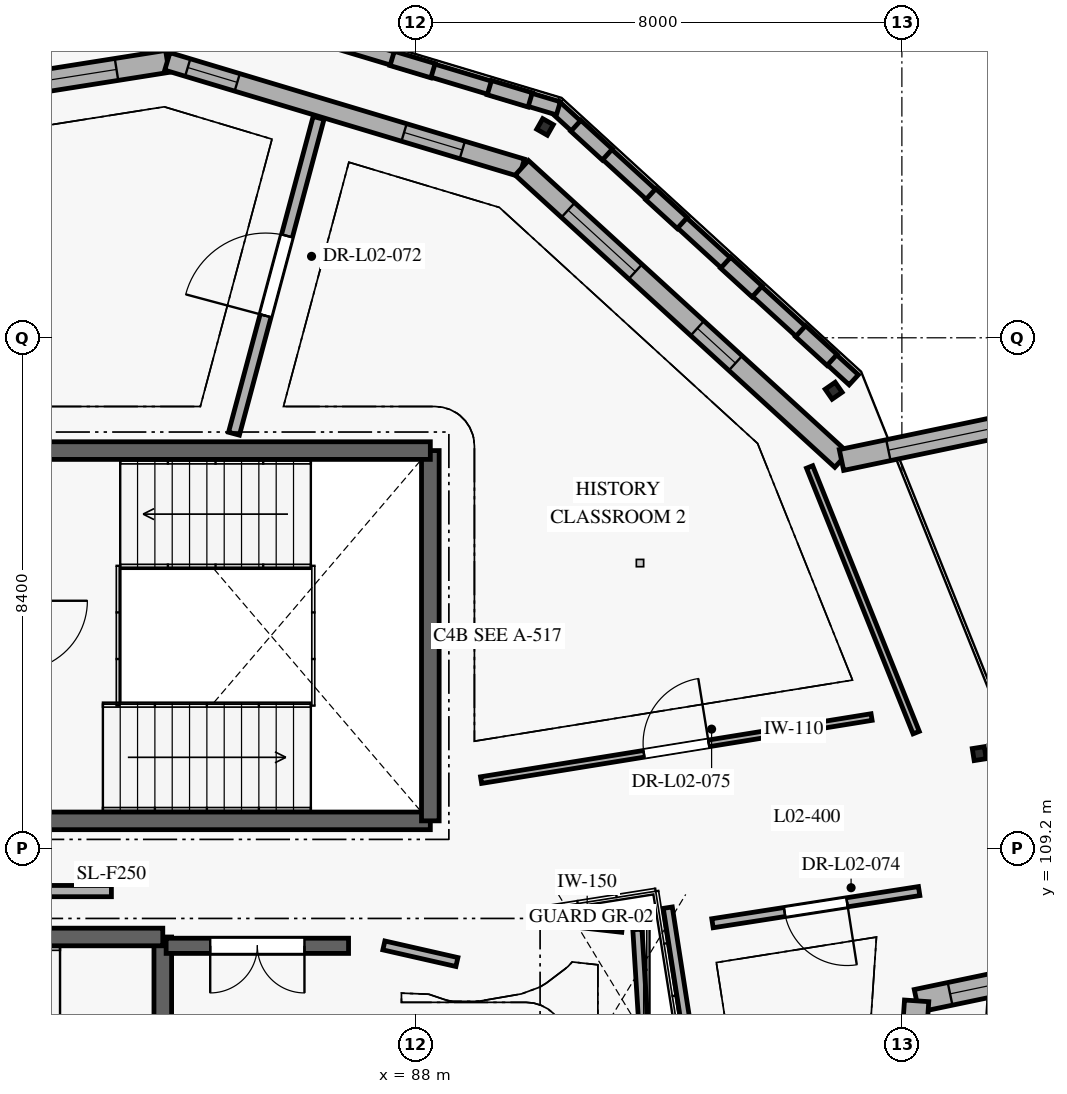
"""IFC4 building model, lengths in metres.
Left out: names, types, materials, properties, quantities, classifications, styles, units other than length and angle.
Written with IfcOpenShell. Run it as: python <this file> out.ifc"""

import sys

from ifc_helpers import new_model, si_unit, direction, frame, frame_2d, origin, origin_2d, place, context, subcontext, project, spatial, rectangle, hollow_rectangle, extrude, element, fill, save


model = new_model("IFC4")
c1 = context("Model", 3, precision=1e-05, world=origin(), true_north=direction((0.0, 1.0)))
c2 = subcontext(c1, "Body", "Model", "MODEL_VIEW")
j1 = project(units=[si_unit("LENGTHUNIT", "METRE"), si_unit("PLANEANGLEUNIT", "RADIAN")], contexts=[c1])
p1 = place(None, origin())
s1 = spatial("IfcSite", under=j1, at=p1, CompositionType="ELEMENT")
p2 = place(p1, origin())
s2 = spatial("IfcBuilding", under=s1, at=p2, CompositionType="ELEMENT")
p3 = place(p2, frame((0.0, 0.0, 8.4)))
s3 = spatial("IfcBuildingStorey", under=s2, at=p3, CompositionType="ELEMENT", Elevation=8.4)
for number, where, z_axis, x_axis in (
    (1, (97.272, 110.76, 0.0), (0.0, 0.0, 1.0), (-0.156, 0.988, 0.0)),
    (2, (94.878, 116.729, 0.0), (0.0, 0.0, 1.0), (-0.569, 0.822, 0.0)),
    (3, (90.131, 121.068, 0.0), (0.0, 0.0, 1.0), (-0.87, 0.493, 0.0)),
):
    element("IfcColumn", number, at=place(p3, frame(where, z_axis=z_axis, x_axis=x_axis)), inside=s3, PredefinedType="COLUMN", context=c2, shape_type="SweptSolid", body=[
        extrude(hollow_rectangle(XDim=0.2, YDim=0.2, WallThickness=0.012, InnerFilletRadius=0.012, OuterFilletRadius=0.019, at=origin_2d()), origin(), (0.0, 0.0, 1.0), 4.2),
    ])
p4 = place(p3, frame((103.532, 108.22, 0.0), z_axis=(0.0, 0.0, 1.0), x_axis=(-0.978786344777, -0.204883604222, 0.0)))
e4 = element("IfcWall", 4, at=p4, inside=s3, PredefinedType="SOLIDWALL", context=c2, shape_type="SweptSolid", body=[
    extrude(rectangle(XDim=7.448, YDim=0.38, at=frame_2d((3.724, 0.0))), origin(), (0.0, 0.0, 1.0), 3.94),
])
p5 = place(p4, frame((0.662, 0.0, 0.85)))
e5 = element("IfcOpeningElement", 5, at=p5, cuts=e4, PredefinedType="OPENING", context=c2, shape_type="SweptSolid", body=[
    extrude(rectangle(XDim=2.4, YDim=1.6, at=frame_2d((1.2, 0.8))), frame((0.0, 0.2, 0.0), z_axis=(0.0, -1.0, 0.0), x_axis=(1.0, 0.0, 0.0)), (0.0, 0.0, 1.0), 0.4),
])
p6 = place(p4, frame((4.286, 0.0, 0.85)))
e6 = element("IfcOpeningElement", 6, at=p6, cuts=e4, PredefinedType="OPENING", context=c2, shape_type="SweptSolid", body=[
    extrude(rectangle(XDim=2.6, YDim=1.6, at=frame_2d((1.3, 0.8))), frame((0.0, 0.2, 0.0), z_axis=(0.0, -1.0, 0.0), x_axis=(1.0, 0.0, 0.0)), (0.0, 0.0, 1.0), 0.4),
])
p7 = place(p3, frame((96.243, 106.695, 0.0), z_axis=(0.0, 0.0, 1.0), x_axis=(-0.067309145793, -0.997732167915, 0.0)))
e7 = element("IfcWall", 7, at=p7, inside=s3, PredefinedType="SOLIDWALL", context=c2, shape_type="SweptSolid", body=[
    extrude(rectangle(XDim=2.133, YDim=0.4, at=frame_2d((1.066, 0.0))), origin(), (0.0, 0.0, 1.0), 3.94),
])
p8 = place(p7, frame((0.616, 0.0, 0.85)))
e8 = element("IfcOpeningElement", 8, at=p8, cuts=e7, PredefinedType="OPENING", context=c2, shape_type="SweptSolid", body=[
    extrude(rectangle(XDim=0.9, YDim=1.8, at=frame_2d((0.45, 0.9))), frame((0.0, 0.21, 0.0), z_axis=(0.0, -1.0, 0.0), x_axis=(1.0, 0.0, 0.0)), (0.0, 0.0, 1.0), 0.42),
])
p9 = place(p3, frame((77.908, 121.194, 0.0), z_axis=(0.0, 0.0, 1.0), x_axis=(0.987690665759, 0.156419783824, 0.0)))
e9 = element("IfcWall", 9, at=p9, inside=s3, PredefinedType="SOLIDWALL", context=c2, shape_type="SweptSolid", body=[
    extrude(rectangle(XDim=6.087, YDim=0.365, at=frame_2d((3.043, 0.0))), origin(), (0.0, 0.0, 1.0), 3.94),
])
p10 = place(p9, frame((1.072, 0.0, 0.85)))
e10 = element("IfcOpeningElement", 10, at=p10, cuts=e9, PredefinedType="OPENING", context=c2, shape_type="SweptSolid", body=[
    extrude(rectangle(XDim=0.9, YDim=1.6, at=frame_2d((0.45, 0.8))), frame((0.0, 0.192, 0.0), z_axis=(0.0, -1.0, 0.0), x_axis=(1.0, 0.0, 0.0)), (0.0, 0.0, 1.0), 0.385),
])
p11 = place(p9, frame((3.89, 0.0, 0.85)))
e11 = element("IfcOpeningElement", 11, at=p11, cuts=e9, PredefinedType="OPENING", context=c2, shape_type="SweptSolid", body=[
    extrude(rectangle(XDim=1.35, YDim=1.3, at=frame_2d((0.675, 0.65))), frame((0.0, 0.192, 0.0), z_axis=(0.0, -1.0, 0.0), x_axis=(1.0, 0.0, 0.0)), (0.0, 0.0, 1.0), 0.385),
])
p12 = place(p3, frame((83.92, 122.146, 0.0), z_axis=(0.0, 0.0, 1.0), x_axis=(0.957750075894, -0.28760179437, 0.0)))
e12 = element("IfcWall", 12, at=p12, inside=s3, PredefinedType="SOLIDWALL", context=c2, shape_type="SweptSolid", body=[
    extrude(rectangle(XDim=6.086, YDim=0.3, at=frame_2d((3.043, 0.0))), origin(), (0.0, 0.0, 1.0), 3.94),
])
p13 = place(p12, frame((0.35, 0.0, 0.85)))
e13 = element("IfcOpeningElement", 13, at=p13, cuts=e12, PredefinedType="OPENING", context=c2, shape_type="SweptSolid", body=[
    extrude(rectangle(XDim=0.85, YDim=1.4, at=frame_2d((0.425, 0.7))), frame((0.0, 0.16, 0.0), z_axis=(0.0, -1.0, 0.0), x_axis=(1.0, 0.0, 0.0)), (0.0, 0.0, 1.0), 0.32),
])
p14 = place(p12, frame((4.065, 0.0, 0.85)))
e14 = element("IfcOpeningElement", 14, at=p14, cuts=e12, PredefinedType="OPENING", context=c2, shape_type="SweptSolid", body=[
    extrude(rectangle(XDim=1.0, YDim=1.3, at=frame_2d((0.5, 0.65))), frame((0.0, 0.16, 0.0), z_axis=(0.0, -1.0, 0.0), x_axis=(1.0, 0.0, 0.0)), (0.0, 0.0, 1.0), 0.32),
])
p15 = place(p3, frame((89.75, 120.396, 0.0), z_axis=(0.0, 0.0, 1.0), x_axis=(0.738102453677, -0.674688645136, 0.0)))
e15 = element("IfcWall", 15, at=p15, inside=s3, PredefinedType="SOLIDWALL", context=c2, shape_type="SweptSolid", body=[
    extrude(rectangle(XDim=7.122, YDim=0.325, at=frame_2d((3.561, 0.0))), origin(), (0.0, 0.0, 1.0), 3.94),
])
p16 = place(p15, frame((1.031, 0.0, 0.85)))
e16 = element("IfcOpeningElement", 16, at=p16, cuts=e15, PredefinedType="OPENING", context=c2, shape_type="SweptSolid", body=[
    extrude(rectangle(XDim=1.5, YDim=1.3, at=frame_2d((0.75, 0.65))), frame((0.0, 0.172, 0.0), z_axis=(0.0, -1.0, 0.0), x_axis=(1.0, 0.0, 0.0)), (0.0, 0.0, 1.0), 0.345),
])
p17 = place(p15, frame((3.911, 0.0, 0.85)))
e17 = element("IfcOpeningElement", 17, at=p17, cuts=e15, PredefinedType="OPENING", context=c2, shape_type="SweptSolid", body=[
    extrude(rectangle(XDim=0.85, YDim=1.4, at=frame_2d((0.425, 0.7))), frame((0.0, 0.172, 0.0), z_axis=(0.0, -1.0, 0.0), x_axis=(1.0, 0.0, 0.0)), (0.0, 0.0, 1.0), 0.345),
])
p18 = place(p3, frame((95.007, 115.59, 0.0), z_axis=(0.0, 0.0, 1.0), x_axis=(0.978789137369, 0.204870262772, 0.0)))
e18 = element("IfcWall", 18, at=p18, inside=s3, PredefinedType="SOLIDWALL", context=c2, shape_type="SweptSolid", body=[
    extrude(rectangle(XDim=7.652, YDim=0.35, at=frame_2d((3.826, 0.0))), origin(), (0.0, 0.0, 1.0), 3.409),
])
p19 = place(p18, frame((0.788, 0.0, 0.85)))
e19 = element("IfcOpeningElement", 19, at=p19, cuts=e18, PredefinedType="OPENING", context=c2, shape_type="SweptSolid", body=[
    extrude(rectangle(XDim=2.25, YDim=1.3, at=frame_2d((1.125, 0.65))), frame((0.0, 0.185, 0.0), z_axis=(0.0, -1.0, 0.0), x_axis=(1.0, 0.0, 0.0)), (0.0, 0.0, 1.0), 0.37),
])
p20 = place(p18, frame((4.489, 0.0, 0.85)))
e20 = element("IfcOpeningElement", 20, at=p20, cuts=e18, PredefinedType="OPENING", context=c2, shape_type="SweptSolid", body=[
    extrude(rectangle(XDim=2.5, YDim=1.3, at=frame_2d((1.25, 0.65))), frame((0.0, 0.185, 0.0), z_axis=(0.0, -1.0, 0.0), x_axis=(1.0, 0.0, 0.0)), (0.0, 0.0, 1.0), 0.37),
])
p21 = place(p3, frame((95.208, 116.909, 0.0), z_axis=(0.0, 0.0, 1.0), x_axis=(-0.738121953815, 0.674667311566, 0.0)))
e21 = element("IfcWall", 21, at=p21, inside=s3, PredefinedType="ELEMENTEDWALL", context=c2, shape_type="SweptSolid", body=[
    extrude(rectangle(XDim=6.675, YDim=0.225, at=frame_2d((3.338, 0.0))), origin(), (0.0, 0.0, 1.0), 1.09),
])
for number, where, z_axis, x_axis in (
    (22, (94.851, 117.236, 1.09), (0.0, 0.0, 1.0), (-0.738, 0.675, 0.0)),
    (23, (93.619, 118.362, 1.09), (0.0, 0.0, 1.0), (-0.738, 0.675, 0.0)),
    (24, (92.388, 119.488, 1.09), (0.0, 0.0, 1.0), (-0.738, 0.675, 0.0)),
    (25, (91.156, 120.614, 1.09), (0.0, 0.0, 1.0), (-0.738, 0.675, 0.0)),
):
    element("IfcWall", number, at=place(p3, frame(where, z_axis=z_axis, x_axis=x_axis)), inside=s3, PredefinedType="ELEMENTEDWALL", context=c2, shape_type="SweptSolid", body=[
        extrude(rectangle(XDim=0.701, YDim=0.245, at=frame_2d((0.351, 0.0))), origin(), (0.0, 0.0, 1.0), 2.85),
    ])
p22 = place(p3, frame((90.351, 121.374, 0.0), z_axis=(0.0, 0.0, 1.0), x_axis=(-0.957749751871, 0.287602873404, 0.0)))
e26 = element("IfcWall", 26, at=p22, inside=s3, PredefinedType="ELEMENTEDWALL", context=c2, shape_type="SweptSolid", body=[
    extrude(rectangle(XDim=6.676, YDim=0.225, at=frame_2d((3.338, 0.0))), origin(), (0.0, 0.0, 1.0), 1.09),
])
for number, where, z_axis, x_axis in (
    (27, (89.887, 121.513, 1.09), (0.0, 0.0, 1.0), (-0.958, 0.288, 0.0)),
    (28, (88.289, 121.993, 1.09), (0.0, 0.0, 1.0), (-0.958, 0.288, 0.0)),
):
    element("IfcWall", number, at=place(p3, frame(where, z_axis=z_axis, x_axis=x_axis)), inside=s3, PredefinedType="ELEMENTEDWALL", context=c2, shape_type="SweptSolid", body=[
        extrude(rectangle(XDim=0.701, YDim=0.245, at=frame_2d((0.351, 0.0))), origin(), (0.0, 0.0, 1.0), 2.85),
    ])
p23 = place(p3, frame((84.037, 123.288, 0.0), z_axis=(0.0, 0.0, 1.0), x_axis=(-0.987690206406, -0.156422684322, 0.0)))
e29 = element("IfcWall", 29, at=p23, inside=s3, PredefinedType="ELEMENTEDWALL", context=c2, shape_type="SweptSolid", body=[
    extrude(rectangle(XDim=6.676, YDim=0.225, at=frame_2d((3.338, 0.0))), origin(), (0.0, 0.0, 1.0), 1.09),
])
p24 = place(p3, frame((83.845, 101.655, 0.0), z_axis=(0.0, 0.0, 1.0), x_axis=(0.0, 1.0, 0.0)))
e30 = element("IfcWall", 30, at=p24, inside=s3, PredefinedType="SHEAR", context=c2, shape_type="SweptSolid", body=[
    extrude(rectangle(XDim=6.09, YDim=0.29, at=frame_2d((3.045, 0.0))), origin(), (0.0, 0.0, 1.0), 3.95),
])
p25 = place(p24, frame((2.47, 0.0, 0.0)))
e31 = element("IfcOpeningElement", 31, at=p25, cuts=e30, PredefinedType="OPENING", context=c2, shape_type="SweptSolid", body=[
    extrude(rectangle(XDim=1.15, YDim=2.1, at=frame_2d((0.575, 1.05))), frame((0.0, 0.155, 0.0), z_axis=(0.0, -1.0, 0.0), x_axis=(1.0, 0.0, 0.0)), (0.0, 0.0, 1.0), 0.31),
])
p26 = place(p3, frame((83.845, 107.745, 0.0), z_axis=(0.0, 0.0, 1.0), x_axis=(-1.0, 0.0, 0.0)))
e32 = element("IfcWall", 32, at=p26, inside=s3, PredefinedType="SHEAR", context=c2, shape_type="SweptSolid", body=[
    extrude(rectangle(XDim=6.79, YDim=0.29, at=frame_2d((3.395, 0.0))), origin(), (0.0, 0.0, 1.0), 3.95),
])
p27 = place(p3, frame((86.9, 107.6, 0.0), z_axis=(0.0, 0.0, 1.0), x_axis=(-1.0, 0.0, 0.0)))
e33 = element("IfcWall", 33, at=p27, inside=s3, PredefinedType="SHEAR", context=c2, shape_type="SweptSolid", body=[
    extrude(rectangle(XDim=3.0, YDim=0.25, at=frame_2d((1.5, 0.0))), origin(), (0.0, 0.0, 1.0), 3.95),
])
p28 = place(p27, frame((0.725, 0.0, 0.0)))
e34 = element("IfcOpeningElement", 34, at=p28, cuts=e33, PredefinedType="OPENING", context=c2, shape_type="SweptSolid", body=[
    extrude(rectangle(XDim=1.55, YDim=2.15, at=frame_2d((0.775, 1.075))), frame((0.0, 0.135, 0.0), z_axis=(0.0, -1.0, 0.0), x_axis=(1.0, 0.0, 0.0)), (0.0, 0.0, 1.0), 0.27),
])
p29 = place(p3, frame((81.455, 109.655, 0.0), z_axis=(0.0, 0.0, 1.0), x_axis=(1.0, 0.0, 0.0)))
e35 = element("IfcWall", 35, at=p29, inside=s3, PredefinedType="SHEAR", context=c2, shape_type="SweptSolid", body=[
    extrude(rectangle(XDim=6.79, YDim=0.29, at=frame_2d((3.395, 0.0))), origin(), (0.0, 0.0, 1.0), 3.95),
])
p30 = place(p3, frame((88.245, 109.655, 0.0), z_axis=(0.0, 0.0, 1.0), x_axis=(0.0, 1.0, 0.0)))
e36 = element("IfcWall", 36, at=p30, inside=s3, PredefinedType="SHEAR", context=c2, shape_type="SweptSolid", body=[
    extrude(rectangle(XDim=6.09, YDim=0.29, at=frame_2d((3.045, 0.0))), origin(), (0.0, 0.0, 1.0), 3.95),
])
p31 = place(p3, frame((88.245, 115.745, 0.0), z_axis=(0.0, 0.0, 1.0), x_axis=(-1.0, 0.0, 0.0)))
e37 = element("IfcWall", 37, at=p31, inside=s3, PredefinedType="SHEAR", context=c2, shape_type="SweptSolid", body=[
    extrude(rectangle(XDim=6.79, YDim=0.29, at=frame_2d((3.395, 0.0))), origin(), (0.0, 0.0, 1.0), 3.95),
])
p32 = place(p3, frame((81.317, 108.5, 0.0), z_axis=(0.0, 0.0, 1.0), x_axis=(1.0, 0.0, 0.0)))
e38 = element("IfcWall", 38, at=p32, inside=s3, PredefinedType="PARTITIONING", context=c2, shape_type="SweptSolid", body=[
    extrude(rectangle(XDim=1.683, YDim=0.185, at=frame_2d((0.842, 0.0))), origin(), (0.0, 0.0, 1.0), 3.94),
])
p33 = place(p3, frame((85.016, 116.022, 0.0), z_axis=(0.0, 0.0, 1.0), x_axis=(0.258804170678, 0.965929811756, 0.0)))
e39 = element("IfcWall", 39, at=p33, inside=s3, PredefinedType="PARTITIONING", context=c2, shape_type="SweptSolid", body=[
    extrude(rectangle(XDim=5.377, YDim=0.185, at=frame_2d((2.688, 0.0))), origin(), (0.0, 0.0, 1.0), 3.94),
])
p34 = place(p33, frame((2.009, 0.0, 0.0)))
e40 = element("IfcOpeningElement", 40, at=p34, cuts=e39, PredefinedType="OPENING", context=c2, shape_type="SweptSolid", body=[
    extrude(rectangle(XDim=1.36, YDim=2.14, at=frame_2d((0.68, 1.07))), frame((0.0, 0.103, 0.0), z_axis=(0.0, -1.0, 0.0), x_axis=(1.0, 0.0, 0.0)), (0.0, 0.0, 1.0), 0.205),
])
p35 = place(p3, frame((96.284, 108.5, 0.0), z_axis=(0.0, 0.0, 1.0), x_axis=(-0.988101852169, -0.153800941937, 0.0)))
e41 = element("IfcWall", 41, at=p35, inside=s3, PredefinedType="PARTITIONING", context=c2, shape_type="SweptSolid", body=[
    extrude(rectangle(XDim=3.44, YDim=0.15, at=frame_2d((1.72, 0.0))), origin(), (0.0, 0.0, 1.0), 3.94),
])
p36 = place(p35, frame((1.2, 0.0, 0.0)))
e42 = element("IfcOpeningElement", 42, at=p36, cuts=e41, PredefinedType="OPENING", context=c2, shape_type="SweptSolid", body=[
    extrude(rectangle(XDim=1.04, YDim=2.1, at=frame_2d((0.52, 1.05))), frame((0.0, 0.085, 0.0), z_axis=(0.0, -1.0, 0.0), x_axis=(1.0, 0.0, 0.0)), (0.0, 0.0, 1.0), 0.17),
])
p37 = place(p3, frame((92.15, 108.227, 0.0), z_axis=(0.0, 0.0, 1.0), x_axis=(0.153756576486, -0.988108756761, 0.0)))
e43 = element("IfcWall", 43, at=p37, inside=s3, PredefinedType="PARTITIONING", context=c2, shape_type="SweptSolid", body=[
    extrude(rectangle(XDim=3.206, YDim=0.15, at=frame_2d((1.603, 0.0))), origin(), (0.0, 0.0, 1.0), 3.94),
])
p38 = place(p3, frame((91.843, 104.793, 0.0), z_axis=(0.0, 0.0, 1.0), x_axis=(-0.062659390511, 0.998034969718, 0.0)))
e44 = element("IfcWall", 44, at=p38, inside=s3, PredefinedType="PARTITIONING", context=c2, shape_type="SweptSolid", body=[
    extrude(rectangle(XDim=3.082, YDim=0.15, at=frame_2d((1.541, 0.0))), origin(), (0.0, 0.0, 1.0), 3.94),
])
p39 = place(p3, frame((91.402, 107.896, 0.0), z_axis=(0.0, 0.0, 1.0), x_axis=(-0.993757546788, 0.111561365189, 0.0)))
e45 = element("IfcWall", 45, at=p39, inside=s3, PredefinedType="PARTITIONING", context=c2, shape_type="SweptSolid", body=[
    extrude(rectangle(XDim=1.162, YDim=0.15, at=frame_2d((0.581, 0.0))), origin(), (0.0, 0.0, 1.0), 3.94),
])
p40 = place(p3, frame((88.682, 107.333, 0.0), z_axis=(0.0, 0.0, 1.0), x_axis=(-0.975140642982, 0.221586837165, 0.0)))
e46 = element("IfcWall", 46, at=p40, inside=s3, PredefinedType="PARTITIONING", context=c2, shape_type="SweptSolid", body=[
    extrude(rectangle(XDim=1.232, YDim=0.15, at=frame_2d((0.616, 0.0))), origin(), (0.0, 0.0, 1.0), 3.94),
])
p41 = place(p3, frame((89.08, 110.325, 0.0), z_axis=(0.0, 0.0, 1.0), x_axis=(0.987210081252, 0.159424764309, 0.0)))
e47 = element("IfcWall", 47, at=p41, inside=s3, PredefinedType="PARTITIONING", context=c2, shape_type="SweptSolid", body=[
    extrude(rectangle(XDim=6.505, YDim=0.11, at=frame_2d((3.253, 0.0))), origin(), (0.0, 0.0, 1.0), 3.94),
])
p42 = place(p41, frame((2.713, 0.0, 0.0)))
e48 = element("IfcOpeningElement", 48, at=p42, cuts=e47, PredefinedType="OPENING", context=c2, shape_type="SweptSolid", body=[
    extrude(rectangle(XDim=1.08, YDim=2.12, at=frame_2d((0.54, 1.06))), frame((0.0, 0.065, 0.0), z_axis=(0.0, -1.0, 0.0), x_axis=(1.0, 0.0, 0.0)), (0.0, 0.0, 1.0), 0.13),
])
p43 = place(p3, frame((96.235, 111.106, 0.0), z_axis=(0.0, 0.0, 1.0), x_axis=(-0.37231147683, 0.928107840835, 0.0)))
e49 = element("IfcWall", 49, at=p43, inside=s3, PredefinedType="PARTITIONING", context=c2, shape_type="SweptSolid", body=[
    extrude(rectangle(XDim=4.708, YDim=0.11, at=frame_2d((2.354, 0.0))), origin(), (0.0, 0.0, 1.0), 3.94),
])
p44 = place(p6, origin())
e50 = element("IfcWindow", 50, at=p44, inside=s3, PartitioningType="SINGLE_PANEL", PredefinedType="WINDOW", context=c2, shape_type="SweptSolid", body=[
    extrude(rectangle(XDim=2.6, YDim=1.6, at=frame_2d((1.3, 0.8))), frame((0.0, 0.03, 0.0), z_axis=(0.0, -1.0, 0.0), x_axis=(1.0, 0.0, 0.0)), (0.0, 0.0, 1.0), 0.06),
])
fill(e6, e50)
p45 = place(p11, origin())
e51 = element("IfcWindow", 51, at=p45, inside=s3, PartitioningType="SINGLE_PANEL", PredefinedType="WINDOW", context=c2, shape_type="SweptSolid", body=[
    extrude(rectangle(XDim=1.35, YDim=1.3, at=frame_2d((0.675, 0.65))), frame((0.0, 0.03, 0.0), z_axis=(0.0, -1.0, 0.0), x_axis=(1.0, 0.0, 0.0)), (0.0, 0.0, 1.0), 0.06),
])
fill(e11, e51)
p46 = place(p13, origin())
e52 = element("IfcWindow", 52, at=p46, inside=s3, PartitioningType="SINGLE_PANEL", PredefinedType="WINDOW", context=c2, shape_type="SweptSolid", body=[
    extrude(rectangle(XDim=0.85, YDim=1.4, at=frame_2d((0.425, 0.7))), frame((0.0, 0.03, 0.0), z_axis=(0.0, -1.0, 0.0), x_axis=(1.0, 0.0, 0.0)), (0.0, 0.0, 1.0), 0.06),
])
fill(e13, e52)
p47 = place(p14, origin())
e53 = element("IfcWindow", 53, at=p47, inside=s3, PartitioningType="SINGLE_PANEL", PredefinedType="WINDOW", context=c2, shape_type="SweptSolid", body=[
    extrude(rectangle(XDim=1.0, YDim=1.3, at=frame_2d((0.5, 0.65))), frame((0.0, 0.03, 0.0), z_axis=(0.0, -1.0, 0.0), x_axis=(1.0, 0.0, 0.0)), (0.0, 0.0, 1.0), 0.06),
])
fill(e14, e53)
p48 = place(p16, origin())
e54 = element("IfcWindow", 54, at=p48, inside=s3, PartitioningType="SINGLE_PANEL", PredefinedType="WINDOW", context=c2, shape_type="SweptSolid", body=[
    extrude(rectangle(XDim=1.5, YDim=1.3, at=frame_2d((0.75, 0.65))), frame((0.0, 0.03, 0.0), z_axis=(0.0, -1.0, 0.0), x_axis=(1.0, 0.0, 0.0)), (0.0, 0.0, 1.0), 0.06),
])
fill(e16, e54)
p49 = place(p17, origin())
e55 = element("IfcWindow", 55, at=p49, inside=s3, PartitioningType="SINGLE_PANEL", PredefinedType="WINDOW", context=c2, shape_type="SweptSolid", body=[
    extrude(rectangle(XDim=0.85, YDim=1.4, at=frame_2d((0.425, 0.7))), frame((0.0, 0.03, 0.0), z_axis=(0.0, -1.0, 0.0), x_axis=(1.0, 0.0, 0.0)), (0.0, 0.0, 1.0), 0.06),
])
fill(e17, e55)
p50 = place(p19, origin())
e56 = element("IfcWindow", 56, at=p50, inside=s3, PartitioningType="SINGLE_PANEL", PredefinedType="WINDOW", context=c2, shape_type="SweptSolid", body=[
    extrude(rectangle(XDim=2.25, YDim=1.3, at=frame_2d((1.125, 0.65))), frame((0.0, 0.03, 0.0), z_axis=(0.0, -1.0, 0.0), x_axis=(1.0, 0.0, 0.0)), (0.0, 0.0, 1.0), 0.06),
])
fill(e19, e56)
p51 = place(p28, origin())
e57 = element("IfcDoor", 57, at=p51, inside=s3, OperationType="DOUBLE_DOOR_SINGLE_SWING", PredefinedType="DOOR", context=c2, shape_type="SweptSolid", body=[
    extrude(rectangle(XDim=1.55, YDim=2.15, at=frame_2d((0.775, 1.075))), frame((0.0, 0.025, 0.0), z_axis=(0.0, -1.0, 0.0), x_axis=(1.0, 0.0, 0.0)), (0.0, 0.0, 1.0), 0.05),
])
fill(e34, e57)
p52 = place(p34, origin())
e58 = element("IfcDoor", 58, at=p52, inside=s3, OperationType="SINGLE_SWING_LEFT", PredefinedType="DOOR", context=c2, shape_type="SweptSolid", body=[
    extrude(rectangle(XDim=1.36, YDim=2.14, at=frame_2d((0.68, 1.07))), frame((0.0, 0.025, 0.0), z_axis=(0.0, -1.0, 0.0), x_axis=(1.0, 0.0, 0.0)), (0.0, 0.0, 1.0), 0.05),
])
fill(e40, e58)
p53 = place(p36, origin())
e59 = element("IfcDoor", 59, at=p53, inside=s3, OperationType="SINGLE_SWING_LEFT", PredefinedType="DOOR", context=c2, shape_type="SweptSolid", body=[
    extrude(rectangle(XDim=1.04, YDim=2.1, at=frame_2d((0.52, 1.05))), frame((0.0, 0.025, 0.0), z_axis=(0.0, -1.0, 0.0), x_axis=(1.0, 0.0, 0.0)), (0.0, 0.0, 1.0), 0.05),
])
fill(e42, e59)
p54 = place(p42, origin())
e60 = element("IfcDoor", 60, at=p54, inside=s3, OperationType="SINGLE_SWING_RIGHT", PredefinedType="DOOR", context=c2, shape_type="SweptSolid", body=[
    extrude(rectangle(XDim=1.08, YDim=2.12, at=frame_2d((0.54, 1.06))), frame((0.0, 0.025, 0.0), z_axis=(0.0, -1.0, 0.0), x_axis=(1.0, 0.0, 0.0)), (0.0, 0.0, 1.0), 0.05),
])
fill(e48, e60)
save(model, sys.argv[1])
